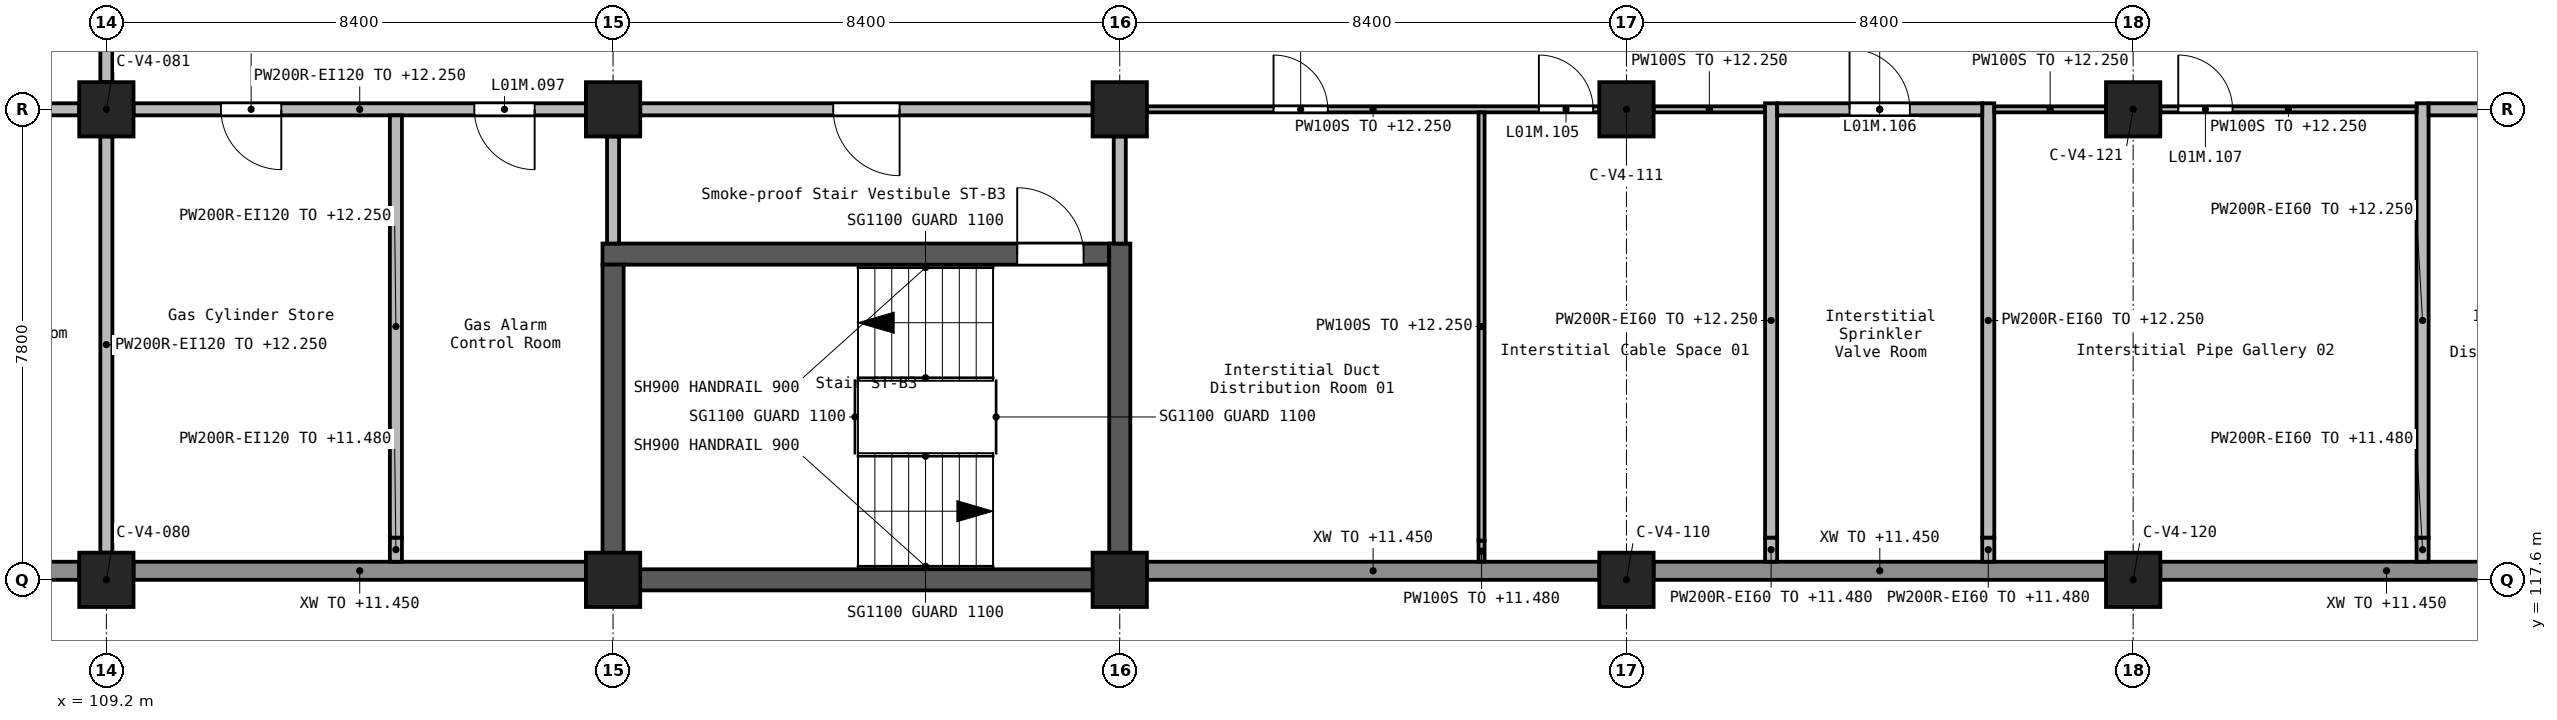
"""IFC4 building model, lengths in metres.
Left out: names, types, materials, properties, quantities, classifications, styles, units other than length and angle.
Written with IfcOpenShell. Run it as: python <this file> out.ifc"""

import sys

from ifc_helpers import new_model, si_unit, direction, frame, frame_2d, origin, origin_2d, place, context, subcontext, project, spatial, rectangle, extrude, element, fill, save


model = new_model("IFC4")
c1 = context("Model", 3, precision=1e-05, world=origin(), true_north=direction((0.0, 1.0)))
c2 = subcontext(c1, "Body", "Model", "MODEL_VIEW")
j1 = project(units=[si_unit("LENGTHUNIT", "METRE"), si_unit("PLANEANGLEUNIT", "RADIAN")], contexts=[c1])
p1 = place(None, origin())
s1 = spatial("IfcSite", under=j1, at=p1, CompositionType="ELEMENT")
p2 = place(p1, origin())
s2 = spatial("IfcBuilding", under=s1, at=p2, CompositionType="ELEMENT")
p3 = place(p2, frame((0.0, 0.0, 9.9)))
s3 = spatial("IfcBuildingStorey", under=s2, at=p3, CompositionType="ELEMENT", Elevation=9.9)
for number, where, z_axis, x_axis in (
    (1, (109.2, 117.6, 0.0), (0.0, 0.0, 1.0), (1.0, 0.0, 0.0)),
    (2, (109.2, 125.4, 0.0), (0.0, 0.0, 1.0), (1.0, 0.0, 0.0)),
    (3, (117.6, 117.6, 0.0), (0.0, 0.0, 1.0), (1.0, 0.0, 0.0)),
    (4, (117.6, 125.4, 0.0), (0.0, 0.0, 1.0), (1.0, 0.0, 0.0)),
    (5, (126.0, 117.6, 0.0), (0.0, 0.0, 1.0), (1.0, 0.0, 0.0)),
    (6, (126.0, 125.4, 0.0), (0.0, 0.0, 1.0), (1.0, 0.0, 0.0)),
    (7, (134.4, 117.6, 0.0), (0.0, 0.0, 1.0), (1.0, 0.0, 0.0)),
    (8, (134.4, 125.4, 0.0), (0.0, 0.0, 1.0), (1.0, 0.0, 0.0)),
    (9, (142.8, 117.6, 0.0), (0.0, 0.0, 1.0), (1.0, 0.0, 0.0)),
    (10, (142.8, 125.4, 0.0), (0.0, 0.0, 1.0), (1.0, 0.0, 0.0)),
):
    element("IfcColumn", number, at=place(p3, frame(where, z_axis=z_axis, x_axis=x_axis)), inside=s3, PredefinedType="COLUMN", context=c2, shape_type="SweptSolid", body=[
        extrude(rectangle(XDim=0.9, YDim=0.9, at=origin_2d()), origin(), (0.0, 0.0, 1.0), 2.7),
    ])
p4 = place(p3, frame((117.425, 123.0, 0.0), z_axis=(0.0, 0.0, 1.0), x_axis=(1.0, 0.0, 0.0)))
e11 = element("IfcWall", 11, at=p4, inside=s3, PredefinedType="SHEAR", context=c2, shape_type="SweptSolid", body=[
    extrude(rectangle(XDim=8.4, YDim=0.35, at=frame_2d((4.2, 0.0))), origin(), (0.0, 0.0, 1.0), 2.7),
])
p5 = place(p4, frame((6.875, 0.0, 0.0)))
e12 = element("IfcOpeningElement", 12, at=p5, cuts=e11, PredefinedType="OPENING", context=c2, shape_type="SweptSolid", body=[
    extrude(rectangle(XDim=1.1, YDim=2.1, at=frame_2d((0.55, 1.05))), frame((0.0, 0.185, 0.0), z_axis=(0.0, -1.0, 0.0), x_axis=(1.0, 0.0, 0.0)), (0.0, 0.0, 1.0), 0.37),
])
p6 = place(p3, frame((117.6, 117.425, 0.0), z_axis=(0.0, 0.0, 1.0), x_axis=(0.0, 1.0, 0.0)))
e13 = element("IfcWall", 13, at=p6, inside=s3, PredefinedType="SHEAR", context=c2, shape_type="SweptSolid", body=[
    extrude(rectangle(XDim=5.4, YDim=0.35, at=frame_2d((2.7, 0.0))), origin(), (0.0, 0.0, 1.0), 2.7),
])
p7 = place(p3, frame((117.775, 117.6, 0.0), z_axis=(0.0, 0.0, 1.0), x_axis=(1.0, 0.0, 0.0)))
e14 = element("IfcWall", 14, at=p7, inside=s3, PredefinedType="SHEAR", context=c2, shape_type="SweptSolid", body=[
    extrude(rectangle(XDim=8.05, YDim=0.35, at=frame_2d((4.025, 0.0))), origin(), (0.0, 0.0, 1.0), 2.7),
])
p8 = place(p3, frame((126.0, 117.425, 0.0), z_axis=(0.0, 0.0, 1.0), x_axis=(0.0, 1.0, 0.0)))
e15 = element("IfcWall", 15, at=p8, inside=s3, PredefinedType="SHEAR", context=c2, shape_type="SweptSolid", body=[
    extrude(rectangle(XDim=5.75, YDim=0.35, at=frame_2d((2.875, 0.0))), origin(), (0.0, 0.0, 1.0), 2.7),
])
for number, where, z_axis, x_axis in (
    (16, (101.25, 117.75, 0.0), (0.0, 0.0, 1.0), (1.0, 0.0, 0.0)),
    (17, (109.65, 117.75, 0.0), (0.0, 0.0, 1.0), (1.0, 0.0, 0.0)),
    (18, (126.45, 117.75, 0.0), (0.0, 0.0, 1.0), (1.0, 0.0, 0.0)),
    (19, (134.85, 117.75, 0.0), (0.0, 0.0, 1.0), (1.0, 0.0, 0.0)),
    (20, (143.25, 117.75, 0.0), (0.0, 0.0, 1.0), (1.0, 0.0, 0.0)),
):
    element("IfcWall", number, at=place(p3, frame(where, z_axis=z_axis, x_axis=x_axis)), inside=s3, PredefinedType="STANDARD", context=c2, shape_type="SweptSolid", body=[
        extrude(rectangle(XDim=7.5, YDim=0.3, at=frame_2d((3.75, 0.0))), origin(), (0.0, 0.0, 1.0), 1.55),
    ])
p9 = place(p3, frame((125.55, 125.4, 0.0), z_axis=(0.0, 0.0, 1.0), x_axis=(-1.0, 0.0, 0.0)))
e21 = element("IfcWall", 21, at=p9, inside=s3, PredefinedType="SOLIDWALL", context=c2, shape_type="SweptSolid", body=[
    extrude(rectangle(XDim=7.5, YDim=0.2, at=frame_2d((3.75, 0.0))), origin(), (0.0, 0.0, 1.0), 2.35),
])
p10 = place(p9, frame((3.2, 0.0, 0.0)))
e22 = element("IfcOpeningElement", 22, at=p10, cuts=e21, PredefinedType="OPENING", context=c2, shape_type="SweptSolid", body=[
    extrude(rectangle(XDim=1.1, YDim=2.1, at=frame_2d((0.55, 1.05))), frame((0.0, 0.11, 0.0), z_axis=(0.0, -1.0, 0.0), x_axis=(1.0, 0.0, 0.0)), (0.0, 0.0, 1.0), 0.22),
])
p11 = place(p3, frame((117.15, 125.4, 0.0), z_axis=(0.0, 0.0, 1.0), x_axis=(-1.0, 0.0, 0.0)))
e23 = element("IfcWall", 23, at=p11, inside=s3, PredefinedType="SOLIDWALL", context=c2, shape_type="SweptSolid", body=[
    extrude(rectangle(XDim=7.5, YDim=0.2, at=frame_2d((3.75, 0.0))), origin(), (0.0, 0.0, 1.0), 2.35),
])
p12 = place(p11, frame((5.05, 0.0, 0.0)))
e24 = element("IfcOpeningElement", 24, at=p12, cuts=e23, PredefinedType="OPENING", context=c2, shape_type="SweptSolid", body=[
    extrude(rectangle(XDim=1.0, YDim=2.1, at=frame_2d((0.5, 1.05))), frame((0.0, 0.11, 0.0), z_axis=(0.0, -1.0, 0.0), x_axis=(1.0, 0.0, 0.0)), (0.0, 0.0, 1.0), 0.22),
])
p13 = place(p11, frame((0.85, 0.0, 0.0)))
e25 = element("IfcOpeningElement", 25, at=p13, cuts=e23, PredefinedType="OPENING", context=c2, shape_type="SweptSolid", body=[
    extrude(rectangle(XDim=1.0, YDim=2.1, at=frame_2d((0.5, 1.05))), frame((0.0, 0.11, 0.0), z_axis=(0.0, -1.0, 0.0), x_axis=(1.0, 0.0, 0.0)), (0.0, 0.0, 1.0), 0.22),
])
p14 = place(p3, frame((108.75, 125.4, 0.0), z_axis=(0.0, 0.0, 1.0), x_axis=(-1.0, 0.0, 0.0)))
e26 = element("IfcWall", 26, at=p14, inside=s3, PredefinedType="SOLIDWALL", context=c2, shape_type="SweptSolid", body=[
    extrude(rectangle(XDim=7.5, YDim=0.2, at=frame_2d((3.75, 0.0))), origin(), (0.0, 0.0, 1.0), 2.35),
])
p15 = place(p14, frame((5.65, 0.0, 0.0)))
e27 = element("IfcOpeningElement", 27, at=p15, cuts=e26, PredefinedType="OPENING", context=c2, shape_type="SweptSolid", body=[
    extrude(rectangle(XDim=1.0, YDim=2.1, at=frame_2d((0.5, 1.05))), frame((0.0, 0.11, 0.0), z_axis=(0.0, -1.0, 0.0), x_axis=(1.0, 0.0, 0.0)), (0.0, 0.0, 1.0), 0.22),
])
p16 = place(p14, frame((1.45, 0.0, 0.0)))
e28 = element("IfcOpeningElement", 28, at=p16, cuts=e26, PredefinedType="OPENING", context=c2, shape_type="SweptSolid", body=[
    extrude(rectangle(XDim=1.0, YDim=2.1, at=frame_2d((0.5, 1.05))), frame((0.0, 0.11, 0.0), z_axis=(0.0, -1.0, 0.0), x_axis=(1.0, 0.0, 0.0)), (0.0, 0.0, 1.0), 0.22),
])
p17 = place(p3, frame((109.2, 128.55, 0.0), z_axis=(0.0, 0.0, 1.0), x_axis=(0.0, -1.0, 0.0)))
e29 = element("IfcWall", 29, at=p17, inside=s3, PredefinedType="SOLIDWALL", context=c2, shape_type="SweptSolid", body=[
    extrude(rectangle(XDim=2.7, YDim=0.2, at=frame_2d((1.35, 0.0))), origin(), (0.0, 0.0, 1.0), 2.35),
])
p18 = place(p3, frame((109.2, 124.95, 0.0), z_axis=(0.0, 0.0, 1.0), x_axis=(0.0, -1.0, 0.0)))
e30 = element("IfcWall", 30, at=p18, inside=s3, PredefinedType="SOLIDWALL", context=c2, shape_type="SweptSolid", body=[
    extrude(rectangle(XDim=6.9, YDim=0.2, at=frame_2d((3.45, 0.0))), origin(), (0.0, 0.0, 1.0), 2.35),
])
p19 = place(p3, frame((117.6, 123.175, 0.0), z_axis=(0.0, 0.0, 1.0), x_axis=(0.0, 1.0, 0.0)))
e31 = element("IfcWall", 31, at=p19, inside=s3, PredefinedType="SOLIDWALL", context=c2, shape_type="SweptSolid", body=[
    extrude(rectangle(XDim=1.775, YDim=0.2, at=frame_2d((0.887, 0.0))), origin(), (0.0, 0.0, 1.0), 2.35),
])
p20 = place(p3, frame((114.0, 117.9, 0.0), z_axis=(0.0, 0.0, 1.0), x_axis=(0.0, 1.0, 0.0)))
e32 = element("IfcWall", 32, at=p20, inside=s3, PredefinedType="SOLIDWALL", context=c2, shape_type="SweptSolid", body=[
    extrude(rectangle(XDim=0.4, YDim=0.2, at=frame_2d((0.2, 0.0))), origin(), (0.0, 0.0, 1.0), 1.58),
])
p21 = place(p3, frame((114.0, 118.3, 0.0), z_axis=(0.0, 0.0, 1.0), x_axis=(0.0, 1.0, 0.0)))
e33 = element("IfcWall", 33, at=p21, inside=s3, PredefinedType="SOLIDWALL", context=c2, shape_type="SweptSolid", body=[
    extrude(rectangle(XDim=7.0, YDim=0.2, at=frame_2d((3.5, 0.0))), origin(), (0.0, 0.0, 1.0), 2.35),
])
p22 = place(p3, frame((136.798, 117.9, 0.0), z_axis=(0.0, 0.0, 1.0), x_axis=(0.0, 1.0, 0.0)))
e34 = element("IfcWall", 34, at=p22, inside=s3, PredefinedType="SOLIDWALL", context=c2, shape_type="SweptSolid", body=[
    extrude(rectangle(XDim=0.4, YDim=0.2, at=frame_2d((0.2, 0.0))), origin(), (0.0, 0.0, 1.0), 1.58),
])
p23 = place(p3, frame((136.798, 118.3, 0.0), z_axis=(0.0, 0.0, 1.0), x_axis=(0.0, 1.0, 0.0)))
e35 = element("IfcWall", 35, at=p23, inside=s3, PredefinedType="SOLIDWALL", context=c2, shape_type="SweptSolid", body=[
    extrude(rectangle(XDim=7.2, YDim=0.2, at=frame_2d((3.6, 0.0))), origin(), (0.0, 0.0, 1.0), 2.35),
])
p24 = place(p3, frame((140.398, 117.9, 0.0), z_axis=(0.0, 0.0, 1.0), x_axis=(0.0, 1.0, 0.0)))
e36 = element("IfcWall", 36, at=p24, inside=s3, PredefinedType="SOLIDWALL", context=c2, shape_type="SweptSolid", body=[
    extrude(rectangle(XDim=0.4, YDim=0.2, at=frame_2d((0.2, 0.0))), origin(), (0.0, 0.0, 1.0), 1.58),
])
p25 = place(p3, frame((140.398, 118.3, 0.0), z_axis=(0.0, 0.0, 1.0), x_axis=(0.0, 1.0, 0.0)))
e37 = element("IfcWall", 37, at=p25, inside=s3, PredefinedType="SOLIDWALL", context=c2, shape_type="SweptSolid", body=[
    extrude(rectangle(XDim=7.2, YDim=0.2, at=frame_2d((3.6, 0.0))), origin(), (0.0, 0.0, 1.0), 2.35),
])
p26 = place(p3, frame((147.598, 117.9, 0.0), z_axis=(0.0, 0.0, 1.0), x_axis=(0.0, 1.0, 0.0)))
e38 = element("IfcWall", 38, at=p26, inside=s3, PredefinedType="SOLIDWALL", context=c2, shape_type="SweptSolid", body=[
    extrude(rectangle(XDim=0.4, YDim=0.2, at=frame_2d((0.2, 0.0))), origin(), (0.0, 0.0, 1.0), 1.58),
])
p27 = place(p3, frame((147.598, 118.3, 0.0), z_axis=(0.0, 0.0, 1.0), x_axis=(0.0, 1.0, 0.0)))
e39 = element("IfcWall", 39, at=p27, inside=s3, PredefinedType="SOLIDWALL", context=c2, shape_type="SweptSolid", body=[
    extrude(rectangle(XDim=7.2, YDim=0.2, at=frame_2d((3.6, 0.0))), origin(), (0.0, 0.0, 1.0), 2.35),
])
p28 = place(p3, frame((147.698, 125.4, 0.0), z_axis=(0.0, 0.0, 1.0), x_axis=(1.0, 0.0, 0.0)))
e40 = element("IfcWall", 40, at=p28, inside=s3, PredefinedType="SOLIDWALL", context=c2, shape_type="SweptSolid", body=[
    extrude(rectangle(XDim=3.052, YDim=0.2, at=frame_2d((1.526, 0.0))), origin(), (0.0, 0.0, 1.0), 2.35),
])
p29 = place(p28, frame((1.201, 0.0, 0.0)))
e41 = element("IfcOpeningElement", 41, at=p29, cuts=e40, PredefinedType="OPENING", context=c2, shape_type="SweptSolid", body=[
    extrude(rectangle(XDim=1.0, YDim=2.1, at=frame_2d((0.5, 1.05))), frame((0.0, 0.11, 0.0), z_axis=(0.0, -1.0, 0.0), x_axis=(1.0, 0.0, 0.0)), (0.0, 0.0, 1.0), 0.22),
])
p30 = place(p3, frame((136.898, 125.4, 0.0), z_axis=(0.0, 0.0, 1.0), x_axis=(1.0, 0.0, 0.0)))
e42 = element("IfcWall", 42, at=p30, inside=s3, PredefinedType="SOLIDWALL", context=c2, shape_type="SweptSolid", body=[
    extrude(rectangle(XDim=3.4, YDim=0.2, at=frame_2d((1.7, 0.0))), origin(), (0.0, 0.0, 1.0), 2.35),
])
p31 = place(p30, frame((1.2, 0.0, 0.0)))
e43 = element("IfcOpeningElement", 43, at=p31, cuts=e42, PredefinedType="OPENING", context=c2, shape_type="SweptSolid", body=[
    extrude(rectangle(XDim=1.0, YDim=2.1, at=frame_2d((0.5, 1.05))), frame((0.0, 0.11, 0.0), z_axis=(0.0, -1.0, 0.0), x_axis=(1.0, 0.0, 0.0)), (0.0, 0.0, 1.0), 0.22),
])
p32 = place(p3, frame((126.0, 123.175, 0.0), z_axis=(0.0, 0.0, 1.0), x_axis=(0.0, 1.0, 0.0)))
e44 = element("IfcWall", 44, at=p32, inside=s3, PredefinedType="SOLIDWALL", context=c2, shape_type="SweptSolid", body=[
    extrude(rectangle(XDim=1.775, YDim=0.2, at=frame_2d((0.887, 0.0))), origin(), (0.0, 0.0, 1.0), 2.35),
])
p33 = place(p3, frame((126.45, 125.4, 0.0), z_axis=(0.0, 0.0, 1.0), x_axis=(1.0, 0.0, 0.0)))
e45 = element("IfcWall", 45, at=p33, inside=s3, PredefinedType="PARTITIONING", context=c2, shape_type="SweptSolid", body=[
    extrude(rectangle(XDim=7.5, YDim=0.1, at=frame_2d((3.75, 0.0))), origin(), (0.0, 0.0, 1.0), 2.35),
])
p34 = place(p33, frame((2.099, 0.0, 0.0)))
e46 = element("IfcOpeningElement", 46, at=p34, cuts=e45, PredefinedType="OPENING", context=c2, shape_type="SweptSolid", body=[
    extrude(rectangle(XDim=0.9, YDim=2.1, at=frame_2d((0.45, 1.05))), frame((0.0, 0.06, 0.0), z_axis=(0.0, -1.0, 0.0), x_axis=(1.0, 0.0, 0.0)), (0.0, 0.0, 1.0), 0.12),
])
p35 = place(p33, frame((6.498, 0.0, 0.0)))
e47 = element("IfcOpeningElement", 47, at=p35, cuts=e45, PredefinedType="OPENING", context=c2, shape_type="SweptSolid", body=[
    extrude(rectangle(XDim=0.9, YDim=2.1, at=frame_2d((0.45, 1.05))), frame((0.0, 0.06, 0.0), z_axis=(0.0, -1.0, 0.0), x_axis=(1.0, 0.0, 0.0)), (0.0, 0.0, 1.0), 0.12),
])
p36 = place(p3, frame((134.85, 125.4, 0.0), z_axis=(0.0, 0.0, 1.0), x_axis=(1.0, 0.0, 0.0)))
e48 = element("IfcWall", 48, at=p36, inside=s3, PredefinedType="PARTITIONING", context=c2, shape_type="SweptSolid", body=[
    extrude(rectangle(XDim=1.848, YDim=0.1, at=frame_2d((0.924, 0.0))), origin(), (0.0, 0.0, 1.0), 2.35),
])
p37 = place(p3, frame((131.998, 117.9, 0.0), z_axis=(0.0, 0.0, 1.0), x_axis=(0.0, 1.0, 0.0)))
e49 = element("IfcWall", 49, at=p37, inside=s3, PredefinedType="PARTITIONING", context=c2, shape_type="SweptSolid", body=[
    extrude(rectangle(XDim=0.35, YDim=0.1, at=frame_2d((0.175, 0.0))), origin(), (0.0, 0.0, 1.0), 1.58),
])
p38 = place(p3, frame((131.998, 118.25, 0.0), z_axis=(0.0, 0.0, 1.0), x_axis=(0.0, 1.0, 0.0)))
e50 = element("IfcWall", 50, at=p38, inside=s3, PredefinedType="PARTITIONING", context=c2, shape_type="SweptSolid", body=[
    extrude(rectangle(XDim=7.1, YDim=0.1, at=frame_2d((3.55, 0.0))), origin(), (0.0, 0.0, 1.0), 2.35),
])
p39 = place(p3, frame((140.498, 125.4, 0.0), z_axis=(0.0, 0.0, 1.0), x_axis=(1.0, 0.0, 0.0)))
e51 = element("IfcWall", 51, at=p39, inside=s3, PredefinedType="PARTITIONING", context=c2, shape_type="SweptSolid", body=[
    extrude(rectangle(XDim=1.852, YDim=0.1, at=frame_2d((0.926, 0.0))), origin(), (0.0, 0.0, 1.0), 2.35),
])
p40 = place(p3, frame((143.25, 125.4, 0.0), z_axis=(0.0, 0.0, 1.0), x_axis=(1.0, 0.0, 0.0)))
e52 = element("IfcWall", 52, at=p40, inside=s3, PredefinedType="PARTITIONING", context=c2, shape_type="SweptSolid", body=[
    extrude(rectangle(XDim=4.248, YDim=0.1, at=frame_2d((2.124, 0.0))), origin(), (0.0, 0.0, 1.0), 2.35),
])
p41 = place(p40, frame((0.298, 0.0, 0.0)))
e53 = element("IfcOpeningElement", 53, at=p41, cuts=e52, PredefinedType="OPENING", context=c2, shape_type="SweptSolid", body=[
    extrude(rectangle(XDim=0.9, YDim=2.1, at=frame_2d((0.45, 1.05))), frame((0.0, 0.06, 0.0), z_axis=(0.0, -1.0, 0.0), x_axis=(1.0, 0.0, 0.0)), (0.0, 0.0, 1.0), 0.12),
])
p42 = place(p5, frame((1.1, 0.0, 0.0), z_axis=(0.0, 0.0, 1.0), x_axis=(-1.0, 0.0, 0.0)))
e54 = element("IfcDoor", 54, at=p42, inside=s3, OperationType="SINGLE_SWING_LEFT", PredefinedType="DOOR", context=c2, shape_type="SweptSolid", body=[
    extrude(rectangle(XDim=1.1, YDim=2.1, at=frame_2d((0.55, 1.05))), frame((0.0, 0.025, 0.0), z_axis=(0.0, -1.0, 0.0), x_axis=(1.0, 0.0, 0.0)), (0.0, 0.0, 1.0), 0.05),
])
fill(e12, e54)
p43 = place(p10, origin())
e55 = element("IfcDoor", 55, at=p43, inside=s3, OperationType="SINGLE_SWING_RIGHT", PredefinedType="DOOR", context=c2, shape_type="SweptSolid", body=[
    extrude(rectangle(XDim=1.1, YDim=2.1, at=frame_2d((0.55, 1.05))), frame((0.0, 0.025, 0.0), z_axis=(0.0, -1.0, 0.0), x_axis=(1.0, 0.0, 0.0)), (0.0, 0.0, 1.0), 0.05),
])
fill(e22, e55)
p44 = place(p12, origin())
e56 = element("IfcDoor", 56, at=p44, inside=s3, OperationType="SINGLE_SWING_RIGHT", PredefinedType="DOOR", context=c2, shape_type="SweptSolid", body=[
    extrude(rectangle(XDim=1.0, YDim=2.1, at=frame_2d((0.5, 1.05))), frame((0.0, 0.025, 0.0), z_axis=(0.0, -1.0, 0.0), x_axis=(1.0, 0.0, 0.0)), (0.0, 0.0, 1.0), 0.05),
])
fill(e24, e56)
p45 = place(p13, origin())
e57 = element("IfcDoor", 57, at=p45, inside=s3, OperationType="SINGLE_SWING_LEFT", PredefinedType="DOOR", context=c2, shape_type="SweptSolid", body=[
    extrude(rectangle(XDim=1.0, YDim=2.1, at=frame_2d((0.5, 1.05))), frame((0.0, 0.025, 0.0), z_axis=(0.0, -1.0, 0.0), x_axis=(1.0, 0.0, 0.0)), (0.0, 0.0, 1.0), 0.05),
])
fill(e25, e57)
p46 = place(p34, frame((0.9, 0.0, 0.0), z_axis=(0.0, 0.0, 1.0), x_axis=(-1.0, 0.0, 0.0)))
e58 = element("IfcDoor", 58, at=p46, inside=s3, OperationType="SINGLE_SWING_RIGHT", PredefinedType="DOOR", context=c2, shape_type="SweptSolid", body=[
    extrude(rectangle(XDim=0.9, YDim=2.1, at=frame_2d((0.45, 1.05))), frame((0.0, 0.025, 0.0), z_axis=(0.0, -1.0, 0.0), x_axis=(1.0, 0.0, 0.0)), (0.0, 0.0, 1.0), 0.05),
])
fill(e46, e58)
p47 = place(p35, frame((0.9, 0.0, 0.0), z_axis=(0.0, 0.0, 1.0), x_axis=(-1.0, 0.0, 0.0)))
e59 = element("IfcDoor", 59, at=p47, inside=s3, OperationType="SINGLE_SWING_LEFT", PredefinedType="DOOR", context=c2, shape_type="SweptSolid", body=[
    extrude(rectangle(XDim=0.9, YDim=2.1, at=frame_2d((0.45, 1.05))), frame((0.0, 0.025, 0.0), z_axis=(0.0, -1.0, 0.0), x_axis=(1.0, 0.0, 0.0)), (0.0, 0.0, 1.0), 0.05),
])
fill(e47, e59)
p48 = place(p31, frame((1.0, 0.0, 0.0), z_axis=(0.0, 0.0, 1.0), x_axis=(-1.0, 0.0, 0.0)))
e60 = element("IfcDoor", 60, at=p48, inside=s3, OperationType="SINGLE_SWING_RIGHT", PredefinedType="DOOR", context=c2, shape_type="SweptSolid", body=[
    extrude(rectangle(XDim=1.0, YDim=2.1, at=frame_2d((0.5, 1.05))), frame((0.0, 0.025, 0.0), z_axis=(0.0, -1.0, 0.0), x_axis=(1.0, 0.0, 0.0)), (0.0, 0.0, 1.0), 0.05),
])
fill(e43, e60)
p49 = place(p41, frame((0.9, 0.0, 0.0), z_axis=(0.0, 0.0, 1.0), x_axis=(-1.0, 0.0, 0.0)))
e61 = element("IfcDoor", 61, at=p49, inside=s3, OperationType="SINGLE_SWING_RIGHT", PredefinedType="DOOR", context=c2, shape_type="SweptSolid", body=[
    extrude(rectangle(XDim=0.9, YDim=2.1, at=frame_2d((0.45, 1.05))), frame((0.0, 0.025, 0.0), z_axis=(0.0, -1.0, 0.0), x_axis=(1.0, 0.0, 0.0)), (0.0, 0.0, 1.0), 0.05),
])
fill(e53, e61)
save(model, sys.argv[1])
